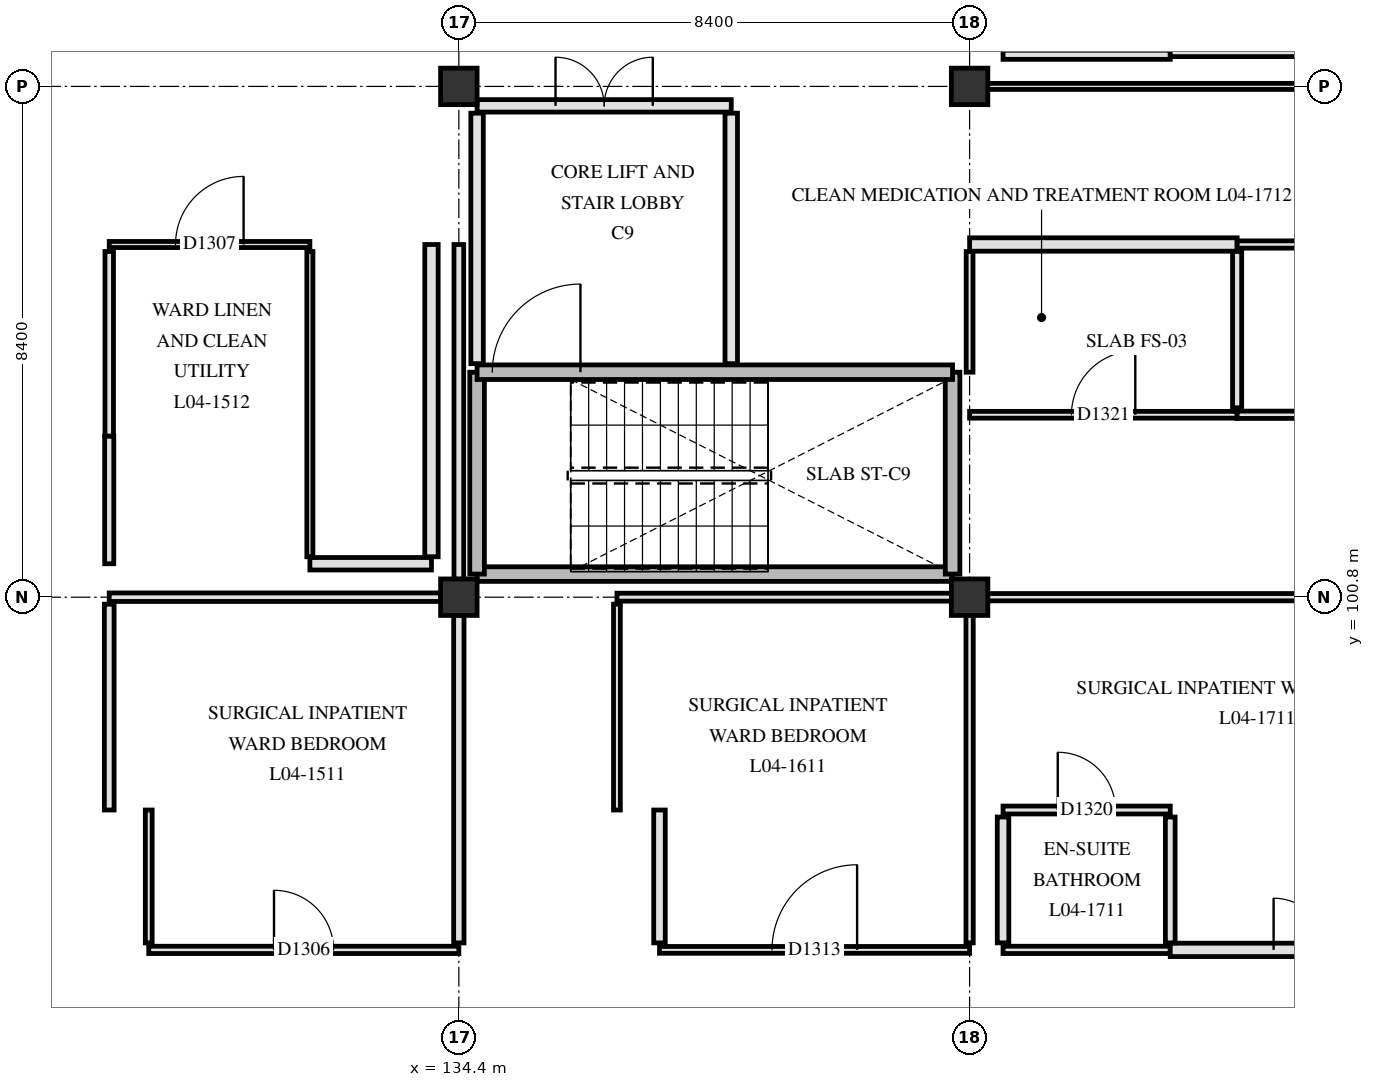
"""IFC4 building model, lengths in metres.
Left out: names, types, materials, properties, quantities, classifications, styles, units other than length and angle.
Written with IfcOpenShell. Run it as: python <this file> out.ifc"""

import sys

from ifc_helpers import new_model, si_unit, direction, frame, frame_2d, origin, origin_2d, place, context, subcontext, project, spatial, rectangle, extrude, element, fill, save


model = new_model("IFC4")
c1 = context("Model", 3, precision=1e-05, world=origin(), true_north=direction((0.0, 1.0)))
c2 = subcontext(c1, "Body", "Model", "MODEL_VIEW")
j1 = project(units=[si_unit("LENGTHUNIT", "METRE"), si_unit("PLANEANGLEUNIT", "RADIAN")], contexts=[c1])
p1 = place(None, origin())
s1 = spatial("IfcSite", under=j1, at=p1, CompositionType="ELEMENT")
p2 = place(p1, origin())
s2 = spatial("IfcBuilding", under=s1, at=p2, CompositionType="ELEMENT")
p3 = place(p2, frame((0.0, 0.0, 18.6)))
s3 = spatial("IfcBuildingStorey", under=s2, at=p3, CompositionType="ELEMENT", Elevation=18.6)
for number, where, z_axis, x_axis in (
    (1, (134.4, 100.8, 0.0), (0.0, 0.0, 1.0), (1.0, 0.0, 0.0)),
    (2, (134.4, 109.2, 0.0), (0.0, 0.0, 1.0), (1.0, 0.0, 0.0)),
    (3, (142.8, 100.8, 0.0), (0.0, 0.0, 1.0), (1.0, 0.0, 0.0)),
    (4, (142.8, 109.2, 0.0), (0.0, 0.0, 1.0), (1.0, 0.0, 0.0)),
):
    element("IfcColumn", number, at=place(p3, frame(where, z_axis=z_axis, x_axis=x_axis)), inside=s3, PredefinedType="COLUMN", context=c2, shape_type="SweptSolid", body=[
        extrude(rectangle(XDim=0.6, YDim=0.6, at=origin_2d()), origin(), (0.0, 0.0, 1.0), 3.9),
    ])
p4 = place(p3, frame((134.7, 101.18, 0.0), z_axis=(0.0, 0.0, 1.0), x_axis=(1.0, 0.0, 0.0)))
e5 = element("IfcWall", 5, at=p4, inside=s3, PredefinedType="SHEAR", context=c2, shape_type="SweptSolid", body=[
    extrude(rectangle(XDim=7.82, YDim=0.24, at=frame_2d((3.91, 0.0))), origin(), (0.0, 0.0, 1.0), 3.62),
])
for number, where, z_axis, x_axis in (
    (6, (134.7, 101.18, 0.0), (0.0, 0.0, 1.0), (0.0, 1.0, 0.0)),
    (7, (142.52, 101.18, 0.0), (0.0, 0.0, 1.0), (0.0, 1.0, 0.0)),
):
    element("IfcWall", number, at=place(p3, frame(where, z_axis=z_axis, x_axis=x_axis)), inside=s3, PredefinedType="SHEAR", context=c2, shape_type="SweptSolid", body=[
        extrude(rectangle(XDim=3.32, YDim=0.24, at=frame_2d((1.66, 0.0))), origin(), (0.0, 0.0, 1.0), 3.62),
    ])
p5 = place(p3, frame((134.7, 104.5, 0.0), z_axis=(0.0, 0.0, 1.0), x_axis=(1.0, 0.0, 0.0)))
e8 = element("IfcWall", 8, at=p5, inside=s3, PredefinedType="SHEAR", context=c2, shape_type="SweptSolid", body=[
    extrude(rectangle(XDim=7.82, YDim=0.24, at=frame_2d((3.91, 0.0))), origin(), (0.0, 0.0, 1.0), 3.62),
])
p6 = place(p5, frame((0.25, 0.0, 0.0)))
e9 = element("IfcOpeningElement", 9, at=p6, cuts=e8, PredefinedType="OPENING", context=c2, shape_type="SweptSolid", body=[
    extrude(rectangle(XDim=1.45, YDim=2.2, at=frame_2d((0.725, 1.1))), frame((0.0, 0.13, 0.0), z_axis=(0.0, -1.0, 0.0), x_axis=(1.0, 0.0, 0.0)), (0.0, 0.0, 1.0), 0.26),
])
for number, where, z_axis, x_axis in (
    (10, (138.88, 104.64, 0.0), (0.0, 0.0, 1.0), (0.0, 1.0, 0.0)),
    (11, (134.7, 104.64, 0.0), (0.0, 0.0, 1.0), (0.0, 1.0, 0.0)),
):
    element("IfcWall", number, at=place(p3, frame(where, z_axis=z_axis, x_axis=x_axis)), inside=s3, PredefinedType="PARTITIONING", context=c2, shape_type="SweptSolid", body=[
        extrude(rectangle(XDim=4.12, YDim=0.205, at=frame_2d((2.06, 0.0))), origin(), (0.0, 0.0, 1.0), 3.61),
    ])
p7 = place(p3, frame((134.7, 108.88, 0.0), z_axis=(0.0, 0.0, 1.0), x_axis=(1.0, 0.0, 0.0)))
e12 = element("IfcWall", 12, at=p7, inside=s3, PredefinedType="PARTITIONING", context=c2, shape_type="SweptSolid", body=[
    extrude(rectangle(XDim=4.18, YDim=0.205, at=frame_2d((2.09, 0.0))), origin(), (0.0, 0.0, 1.0), 3.61),
])
p8 = place(p7, frame((1.29, 0.0, 0.0)))
e13 = element("IfcOpeningElement", 13, at=p8, cuts=e12, PredefinedType="OPENING", context=c2, shape_type="SweptSolid", body=[
    extrude(rectangle(XDim=1.6, YDim=2.25, at=frame_2d((0.8, 1.125))), frame((0.0, 0.113, 0.0), z_axis=(0.0, -1.0, 0.0), x_axis=(1.0, 0.0, 0.0)), (0.0, 0.0, 1.0), 0.225),
])
p9 = place(p3, frame((129.3, 95.0, 0.0), z_axis=(0.0, 0.0, 1.0), x_axis=(1.0, 0.0, 0.0)))
e14 = element("IfcWall", 14, at=p9, inside=s3, PredefinedType="PARTITIONING", context=c2, shape_type="SweptSolid", body=[
    extrude(rectangle(XDim=5.1, YDim=0.12, at=frame_2d((2.55, 0.0))), origin(), (0.0, 0.0, 1.0), 3.26),
])
p10 = place(p9, frame((2.06, 0.0, 0.0)))
e15 = element("IfcOpeningElement", 15, at=p10, cuts=e14, PredefinedType="OPENING", context=c2, shape_type="SweptSolid", body=[
    extrude(rectangle(XDim=0.98, YDim=2.12, at=frame_2d((0.49, 1.06))), frame((0.0, 0.07, 0.0), z_axis=(0.0, -1.0, 0.0), x_axis=(1.0, 0.0, 0.0)), (0.0, 0.0, 1.0), 0.14),
])
p11 = place(p3, frame((137.7, 95.0, 0.0), z_axis=(0.0, 0.0, 1.0), x_axis=(1.0, 0.0, 0.0)))
e16 = element("IfcWall", 16, at=p11, inside=s3, PredefinedType="PARTITIONING", context=c2, shape_type="SweptSolid", body=[
    extrude(rectangle(XDim=5.1, YDim=0.112, at=frame_2d((2.55, 0.0))), origin(), (0.0, 0.0, 1.0), 3.26),
])
p12 = place(p11, frame((1.85, 0.0, 0.0)))
e17 = element("IfcOpeningElement", 17, at=p12, cuts=e16, PredefinedType="OPENING", context=c2, shape_type="SweptSolid", body=[
    extrude(rectangle(XDim=1.4, YDim=2.2, at=frame_2d((0.7, 1.1))), frame((0.0, 0.066, 0.0), z_axis=(0.0, -1.0, 0.0), x_axis=(1.0, 0.0, 0.0)), (0.0, 0.0, 1.0), 0.132),
])
p13 = place(p3, frame((143.35, 95.0, 0.0), z_axis=(0.0, 0.0, 1.0), x_axis=(1.0, 0.0, 0.0)))
e18 = element("IfcWall", 18, at=p13, inside=s3, PredefinedType="PARTITIONING", context=c2, shape_type="SweptSolid", body=[
    extrude(rectangle(XDim=2.75, YDim=0.12, at=frame_2d((1.375, 0.0))), origin(), (0.0, 0.0, 1.0), 3.61),
])
p14 = place(p3, frame((146.1, 95.0, 0.0), z_axis=(0.0, 0.0, 1.0), x_axis=(1.0, 0.0, 0.0)))
e19 = element("IfcWall", 19, at=p14, inside=s3, PredefinedType="PARTITIONING", context=c2, shape_type="SweptSolid", body=[
    extrude(rectangle(XDim=5.1, YDim=0.22, at=frame_2d((2.55, 0.0))), origin(), (0.0, 0.0, 1.0), 3.26),
])
p15 = place(p14, frame((1.7, 0.0, 0.0)))
e20 = element("IfcOpeningElement", 20, at=p15, cuts=e19, PredefinedType="OPENING", context=c2, shape_type="SweptSolid", body=[
    extrude(rectangle(XDim=1.7, YDim=2.25, at=frame_2d((0.85, 1.125))), frame((0.0, 0.12, 0.0), z_axis=(0.0, -1.0, 0.0), x_axis=(1.0, 0.0, 0.0)), (0.0, 0.0, 1.0), 0.24),
])
p16 = place(p3, frame((143.35, 97.3, 0.0), z_axis=(0.0, 0.0, 1.0), x_axis=(1.0, 0.0, 0.0)))
e21 = element("IfcWall", 21, at=p16, inside=s3, PredefinedType="PARTITIONING", context=c2, shape_type="SweptSolid", body=[
    extrude(rectangle(XDim=2.75, YDim=0.13, at=frame_2d((1.375, 0.0))), origin(), (0.0, 0.0, 1.0), 3.61),
])
p17 = place(p16, frame((0.9, 0.0, 0.0)))
e22 = element("IfcOpeningElement", 22, at=p17, cuts=e21, PredefinedType="OPENING", context=c2, shape_type="SweptSolid", body=[
    extrude(rectangle(XDim=0.95, YDim=2.1, at=frame_2d((0.475, 1.05))), frame((0.0, 0.075, 0.0), z_axis=(0.0, -1.0, 0.0), x_axis=(1.0, 0.0, 0.0)), (0.0, 0.0, 1.0), 0.15),
])
p18 = place(p3, frame((128.65, 100.8, 0.0), z_axis=(0.0, 0.0, 1.0), x_axis=(1.0, 0.0, 0.0)))
e23 = element("IfcWall", 23, at=p18, inside=s3, PredefinedType="PARTITIONING", context=c2, shape_type="SweptSolid", body=[
    extrude(rectangle(XDim=5.455, YDim=0.14, at=frame_2d((2.728, 0.0))), origin(), (0.0, 0.0, 1.0), 3.16),
])
p19 = place(p3, frame((137.0, 100.8, 0.0), z_axis=(0.0, 0.0, 1.0), x_axis=(1.0, 0.0, 0.0)))
e24 = element("IfcWall", 24, at=p19, inside=s3, PredefinedType="PARTITIONING", context=c2, shape_type="SweptSolid", body=[
    extrude(rectangle(XDim=5.505, YDim=0.13, at=frame_2d((2.752, 0.0))), origin(), (0.0, 0.0, 1.0), 3.16),
])
p20 = place(p3, frame((143.095, 100.8, 0.0), z_axis=(0.0, 0.0, 1.0), x_axis=(1.0, 0.0, 0.0)))
e25 = element("IfcWall", 25, at=p20, inside=s3, PredefinedType="PARTITIONING", context=c2, shape_type="SweptSolid", body=[
    extrude(rectangle(XDim=7.81, YDim=0.12, at=frame_2d((3.905, 0.0))), origin(), (0.0, 0.0, 1.0), 3.16),
])
p21 = place(p3, frame((131.95, 101.35, 0.0), z_axis=(0.0, 0.0, 1.0), x_axis=(1.0, 0.0, 0.0)))
e26 = element("IfcWall", 26, at=p21, inside=s3, PredefinedType="PARTITIONING", context=c2, shape_type="SweptSolid", body=[
    extrude(rectangle(XDim=2.0, YDim=0.205, at=frame_2d((1.0, 0.0))), origin(), (0.0, 0.0, 1.0), 3.61),
])
p22 = place(p3, frame((142.8, 103.8, 0.0), z_axis=(0.0, 0.0, 1.0), x_axis=(1.0, 0.0, 0.0)))
e27 = element("IfcWall", 27, at=p22, inside=s3, PredefinedType="PARTITIONING", context=c2, shape_type="SweptSolid", body=[
    extrude(rectangle(XDim=4.4, YDim=0.112, at=frame_2d((2.2, 0.0))), origin(), (0.0, 0.0, 1.0), 3.26),
])
p23 = place(p22, frame((1.675, 0.0, 0.0)))
e28 = element("IfcOpeningElement", 28, at=p23, cuts=e27, PredefinedType="OPENING", context=c2, shape_type="SweptSolid", body=[
    extrude(rectangle(XDim=1.05, YDim=2.15, at=frame_2d((0.525, 1.075))), frame((0.0, 0.066, 0.0), z_axis=(0.0, -1.0, 0.0), x_axis=(1.0, 0.0, 0.0)), (0.0, 0.0, 1.0), 0.132),
])
p24 = place(p3, frame((147.2, 103.8, 0.0), z_axis=(0.0, 0.0, 1.0), x_axis=(1.0, 0.0, 0.0)))
e29 = element("IfcWall", 29, at=p24, inside=s3, PredefinedType="PARTITIONING", context=c2, shape_type="SweptSolid", body=[
    extrude(rectangle(XDim=4.0, YDim=0.12, at=frame_2d((2.0, 0.0))), origin(), (0.0, 0.0, 1.0), 3.26),
])
p25 = place(p24, frame((1.525, 0.0, 0.0)))
e30 = element("IfcOpeningElement", 30, at=p25, cuts=e29, PredefinedType="OPENING", context=c2, shape_type="SweptSolid", body=[
    extrude(rectangle(XDim=0.95, YDim=2.1, at=frame_2d((0.475, 1.05))), frame((0.0, 0.07, 0.0), z_axis=(0.0, -1.0, 0.0), x_axis=(1.0, 0.0, 0.0)), (0.0, 0.0, 1.0), 0.14),
])
p26 = place(p3, frame((128.65, 106.6, 0.0), z_axis=(0.0, 0.0, 1.0), x_axis=(1.0, 0.0, 0.0)))
e31 = element("IfcWall", 31, at=p26, inside=s3, PredefinedType="PARTITIONING", context=c2, shape_type="SweptSolid", body=[
    extrude(rectangle(XDim=3.3, YDim=0.1, at=frame_2d((1.65, 0.0))), origin(), (0.0, 0.0, 1.0), 3.61),
])
p27 = place(p26, frame((1.09, 0.0, 0.0)))
e32 = element("IfcOpeningElement", 32, at=p27, cuts=e31, PredefinedType="OPENING", context=c2, shape_type="SweptSolid", body=[
    extrude(rectangle(XDim=1.12, YDim=2.18, at=frame_2d((0.56, 1.09))), frame((0.0, 0.06, 0.0), z_axis=(0.0, -1.0, 0.0), x_axis=(1.0, 0.0, 0.0)), (0.0, 0.0, 1.0), 0.12),
])
p28 = place(p3, frame((142.8, 106.6, 0.0), z_axis=(0.0, 0.0, 1.0), x_axis=(1.0, 0.0, 0.0)))
e33 = element("IfcWall", 33, at=p28, inside=s3, PredefinedType="PARTITIONING", context=c2, shape_type="SweptSolid", body=[
    extrude(rectangle(XDim=4.4, YDim=0.22, at=frame_2d((2.2, 0.0))), origin(), (0.0, 0.0, 1.0), 3.26),
])
p29 = place(p3, frame((147.2, 106.6, 0.0), z_axis=(0.0, 0.0, 1.0), x_axis=(1.0, 0.0, 0.0)))
e34 = element("IfcWall", 34, at=p29, inside=s3, PredefinedType="PARTITIONING", context=c2, shape_type="SweptSolid", body=[
    extrude(rectangle(XDim=4.0, YDim=0.12, at=frame_2d((2.0, 0.0))), origin(), (0.0, 0.0, 1.0), 3.26),
])
p30 = place(p3, frame((143.095, 109.2, 0.0), z_axis=(0.0, 0.0, 1.0), x_axis=(1.0, 0.0, 0.0)))
e35 = element("IfcWall", 35, at=p30, inside=s3, PredefinedType="PARTITIONING", context=c2, shape_type="SweptSolid", body=[
    extrude(rectangle(XDim=7.81, YDim=0.1, at=frame_2d((3.905, 0.0))), origin(), (0.0, 0.0, 1.0), 3.16),
])
p31 = place(p3, frame((143.35, 109.72, 0.0), z_axis=(0.0, 0.0, 1.0), x_axis=(1.0, 0.0, 0.0)))
e36 = element("IfcWall", 36, at=p31, inside=s3, PredefinedType="PARTITIONING", context=c2, shape_type="SweptSolid", body=[
    extrude(rectangle(XDim=2.75, YDim=0.15, at=frame_2d((1.375, 0.0))), origin(), (0.0, 0.0, 1.0), 3.61),
])
p32 = place(p3, frame((146.1, 109.75, 0.0), z_axis=(0.0, 0.0, 1.0), x_axis=(1.0, 0.0, 0.0)))
e37 = element("IfcWall", 37, at=p32, inside=s3, PredefinedType="PARTITIONING", context=c2, shape_type="SweptSolid", body=[
    extrude(rectangle(XDim=5.1, YDim=0.12, at=frame_2d((2.55, 0.0))), origin(), (0.0, 0.0, 1.0), 3.26),
])
p33 = place(p3, frame((128.65, 97.3, 0.0), z_axis=(0.0, 0.0, 1.0), x_axis=(0.0, 1.0, 0.0)))
e38 = element("IfcWall", 38, at=p33, inside=s3, PredefinedType="PARTITIONING", context=c2, shape_type="SweptSolid", body=[
    extrude(rectangle(XDim=3.385, YDim=0.16, at=frame_2d((1.692, 0.0))), origin(), (0.0, 0.0, 1.0), 3.31),
])
p34 = place(p3, frame((128.65, 101.35, 0.0), z_axis=(0.0, 0.0, 1.0), x_axis=(0.0, 1.0, 0.0)))
e39 = element("IfcWall", 39, at=p34, inside=s3, PredefinedType="PARTITIONING", context=c2, shape_type="SweptSolid", body=[
    extrude(rectangle(XDim=2.1, YDim=0.15, at=frame_2d((1.05, 0.0))), origin(), (0.0, 0.0, 1.0), 3.61),
])
p35 = place(p3, frame((128.65, 103.45, 0.0), z_axis=(0.0, 0.0, 1.0), x_axis=(0.0, 1.0, 0.0)))
e40 = element("IfcWall", 40, at=p35, inside=s3, PredefinedType="PARTITIONING", context=c2, shape_type="SweptSolid", body=[
    extrude(rectangle(XDim=3.035, YDim=0.14, at=frame_2d((1.518, 0.0))), origin(), (0.0, 0.0, 1.0), 3.31),
])
p36 = place(p3, frame((129.3, 95.115, 0.0), z_axis=(0.0, 0.0, 1.0), x_axis=(0.0, 1.0, 0.0)))
e41 = element("IfcWall", 41, at=p36, inside=s3, PredefinedType="PARTITIONING", context=c2, shape_type="SweptSolid", body=[
    extrude(rectangle(XDim=2.185, YDim=0.112, at=frame_2d((1.093, 0.0))), origin(), (0.0, 0.0, 1.0), 3.31),
])
p37 = place(p3, frame((131.95, 101.465, 0.0), z_axis=(0.0, 0.0, 1.0), x_axis=(0.0, 1.0, 0.0)))
e42 = element("IfcWall", 42, at=p37, inside=s3, PredefinedType="PARTITIONING", context=c2, shape_type="SweptSolid", body=[
    extrude(rectangle(XDim=5.02, YDim=0.1, at=frame_2d((2.51, 0.0))), origin(), (0.0, 0.0, 1.0), 3.31),
])
p38 = place(p3, frame((133.95, 101.465, 0.0), z_axis=(0.0, 0.0, 1.0), x_axis=(0.0, 1.0, 0.0)))
e43 = element("IfcWall", 43, at=p38, inside=s3, PredefinedType="PARTITIONING", context=c2, shape_type="SweptSolid", body=[
    extrude(rectangle(XDim=5.135, YDim=0.22, at=frame_2d((2.567, 0.0))), origin(), (0.0, 0.0, 1.0), 3.31),
])
p39 = place(p3, frame((134.4, 95.115, 0.0), z_axis=(0.0, 0.0, 1.0), x_axis=(0.0, 1.0, 0.0)))
e44 = element("IfcWall", 44, at=p39, inside=s3, PredefinedType="PARTITIONING", context=c2, shape_type="SweptSolid", body=[
    extrude(rectangle(XDim=5.39, YDim=0.17, at=frame_2d((2.695, 0.0))), origin(), (0.0, 0.0, 1.0), 3.26),
])
p40 = place(p3, frame((134.4, 101.095, 0.0), z_axis=(0.0, 0.0, 1.0), x_axis=(0.0, 1.0, 0.0)))
e45 = element("IfcWall", 45, at=p40, inside=s3, PredefinedType="PARTITIONING", context=c2, shape_type="SweptSolid", body=[
    extrude(rectangle(XDim=5.505, YDim=0.16, at=frame_2d((2.752, 0.0))), origin(), (0.0, 0.0, 1.0), 3.26),
])
p41 = place(p3, frame((137.0, 97.3, 0.0), z_axis=(0.0, 0.0, 1.0), x_axis=(0.0, 1.0, 0.0)))
e46 = element("IfcWall", 46, at=p41, inside=s3, PredefinedType="PARTITIONING", context=c2, shape_type="SweptSolid", body=[
    extrude(rectangle(XDim=3.385, YDim=0.112, at=frame_2d((1.692, 0.0))), origin(), (0.0, 0.0, 1.0), 3.31),
])
p42 = place(p3, frame((137.7, 95.115, 0.0), z_axis=(0.0, 0.0, 1.0), x_axis=(0.0, 1.0, 0.0)))
e47 = element("IfcWall", 47, at=p42, inside=s3, PredefinedType="PARTITIONING", context=c2, shape_type="SweptSolid", body=[
    extrude(rectangle(XDim=2.185, YDim=0.19, at=frame_2d((1.093, 0.0))), origin(), (0.0, 0.0, 1.0), 3.31),
])
p43 = place(p3, frame((142.8, 95.115, 0.0), z_axis=(0.0, 0.0, 1.0), x_axis=(0.0, 1.0, 0.0)))
e48 = element("IfcWall", 48, at=p43, inside=s3, PredefinedType="PARTITIONING", context=c2, shape_type="SweptSolid", body=[
    extrude(rectangle(XDim=5.39, YDim=0.12, at=frame_2d((2.695, 0.0))), origin(), (0.0, 0.0, 1.0), 3.26),
])
p44 = place(p3, frame((142.8, 104.5, 0.0), z_axis=(0.0, 0.0, 1.0), x_axis=(0.0, 1.0, 0.0)))
e49 = element("IfcWall", 49, at=p44, inside=s3, PredefinedType="PARTITIONING", context=c2, shape_type="SweptSolid", body=[
    extrude(rectangle(XDim=1.985, YDim=0.112, at=frame_2d((0.993, 0.0))), origin(), (0.0, 0.0, 1.0), 3.26),
])
p45 = place(p3, frame((143.35, 95.115, 0.0), z_axis=(0.0, 0.0, 1.0), x_axis=(0.0, 1.0, 0.0)))
e50 = element("IfcWall", 50, at=p45, inside=s3, PredefinedType="PARTITIONING", context=c2, shape_type="SweptSolid", body=[
    extrude(rectangle(XDim=2.07, YDim=0.19, at=frame_2d((1.035, 0.0))), origin(), (0.0, 0.0, 1.0), 3.31),
])
p46 = place(p3, frame((146.1, 95.115, 0.0), z_axis=(0.0, 0.0, 1.0), x_axis=(0.0, 1.0, 0.0)))
e51 = element("IfcWall", 51, at=p46, inside=s3, PredefinedType="PARTITIONING", context=c2, shape_type="SweptSolid", body=[
    extrude(rectangle(XDim=2.07, YDim=0.16, at=frame_2d((1.035, 0.0))), origin(), (0.0, 0.0, 1.0), 3.31),
])
p47 = place(p3, frame((147.2, 103.915, 0.0), z_axis=(0.0, 0.0, 1.0), x_axis=(0.0, 1.0, 0.0)))
e52 = element("IfcWall", 52, at=p47, inside=s3, PredefinedType="PARTITIONING", context=c2, shape_type="SweptSolid", body=[
    extrude(rectangle(XDim=2.57, YDim=0.15, at=frame_2d((1.285, 0.0))), origin(), (0.0, 0.0, 1.0), 3.31),
])
p48 = place(p6, origin())
e53 = element("IfcDoor", 53, at=p48, inside=s3, OperationType="SINGLE_SWING_RIGHT", PredefinedType="DOOR", context=c2, shape_type="SweptSolid", body=[
    extrude(rectangle(XDim=1.45, YDim=2.2, at=frame_2d((0.725, 1.1))), frame((0.0, 0.025, 0.0), z_axis=(0.0, -1.0, 0.0), x_axis=(1.0, 0.0, 0.0)), (0.0, 0.0, 1.0), 0.05),
])
fill(e9, e53)
p49 = place(p8, origin())
e54 = element("IfcDoor", 54, at=p49, inside=s3, OperationType="DOUBLE_SWING_LEFT", PredefinedType="DOOR", context=c2, shape_type="SweptSolid", body=[
    extrude(rectangle(XDim=1.6, YDim=2.25, at=frame_2d((0.8, 1.125))), frame((0.0, 0.025, 0.0), z_axis=(0.0, -1.0, 0.0), x_axis=(1.0, 0.0, 0.0)), (0.0, 0.0, 1.0), 0.05),
])
fill(e13, e54)
p50 = place(p10, origin())
e55 = element("IfcDoor", 55, at=p50, inside=s3, OperationType="SINGLE_SWING_LEFT", PredefinedType="DOOR", context=c2, shape_type="SweptSolid", body=[
    extrude(rectangle(XDim=0.98, YDim=2.12, at=frame_2d((0.49, 1.06))), frame((0.0, 0.025, 0.0), z_axis=(0.0, -1.0, 0.0), x_axis=(1.0, 0.0, 0.0)), (0.0, 0.0, 1.0), 0.05),
])
fill(e15, e55)
p51 = place(p27, origin())
e56 = element("IfcDoor", 56, at=p51, inside=s3, OperationType="SINGLE_SWING_RIGHT", PredefinedType="DOOR", context=c2, shape_type="SweptSolid", body=[
    extrude(rectangle(XDim=1.12, YDim=2.18, at=frame_2d((0.56, 1.09))), frame((0.0, 0.025, 0.0), z_axis=(0.0, -1.0, 0.0), x_axis=(1.0, 0.0, 0.0)), (0.0, 0.0, 1.0), 0.05),
])
fill(e32, e56)
p52 = place(p12, origin())
e57 = element("IfcDoor", 57, at=p52, inside=s3, OperationType="SINGLE_SWING_RIGHT", PredefinedType="DOOR", context=c2, shape_type="SweptSolid", body=[
    extrude(rectangle(XDim=1.4, YDim=2.2, at=frame_2d((0.7, 1.1))), frame((0.0, 0.025, 0.0), z_axis=(0.0, -1.0, 0.0), x_axis=(1.0, 0.0, 0.0)), (0.0, 0.0, 1.0), 0.05),
])
fill(e17, e57)
p53 = place(p15, origin())
e58 = element("IfcDoor", 58, at=p53, inside=s3, OperationType="DOUBLE_SWING_RIGHT", PredefinedType="DOOR", context=c2, shape_type="SweptSolid", body=[
    extrude(rectangle(XDim=1.7, YDim=2.25, at=frame_2d((0.85, 1.125))), frame((0.0, 0.025, 0.0), z_axis=(0.0, -1.0, 0.0), x_axis=(1.0, 0.0, 0.0)), (0.0, 0.0, 1.0), 0.05),
])
fill(e20, e58)
p54 = place(p17, origin())
e59 = element("IfcDoor", 59, at=p54, inside=s3, OperationType="SINGLE_SWING_LEFT", PredefinedType="DOOR", context=c2, shape_type="SweptSolid", body=[
    extrude(rectangle(XDim=0.95, YDim=2.1, at=frame_2d((0.475, 1.05))), frame((0.0, 0.025, 0.0), z_axis=(0.0, -1.0, 0.0), x_axis=(1.0, 0.0, 0.0)), (0.0, 0.0, 1.0), 0.05),
])
fill(e22, e59)
p55 = place(p23, origin())
e60 = element("IfcDoor", 60, at=p55, inside=s3, OperationType="SINGLE_SWING_RIGHT", PredefinedType="DOOR", context=c2, shape_type="SweptSolid", body=[
    extrude(rectangle(XDim=1.05, YDim=2.15, at=frame_2d((0.525, 1.075))), frame((0.0, 0.025, 0.0), z_axis=(0.0, -1.0, 0.0), x_axis=(1.0, 0.0, 0.0)), (0.0, 0.0, 1.0), 0.05),
])
fill(e28, e60)
save(model, sys.argv[1])
